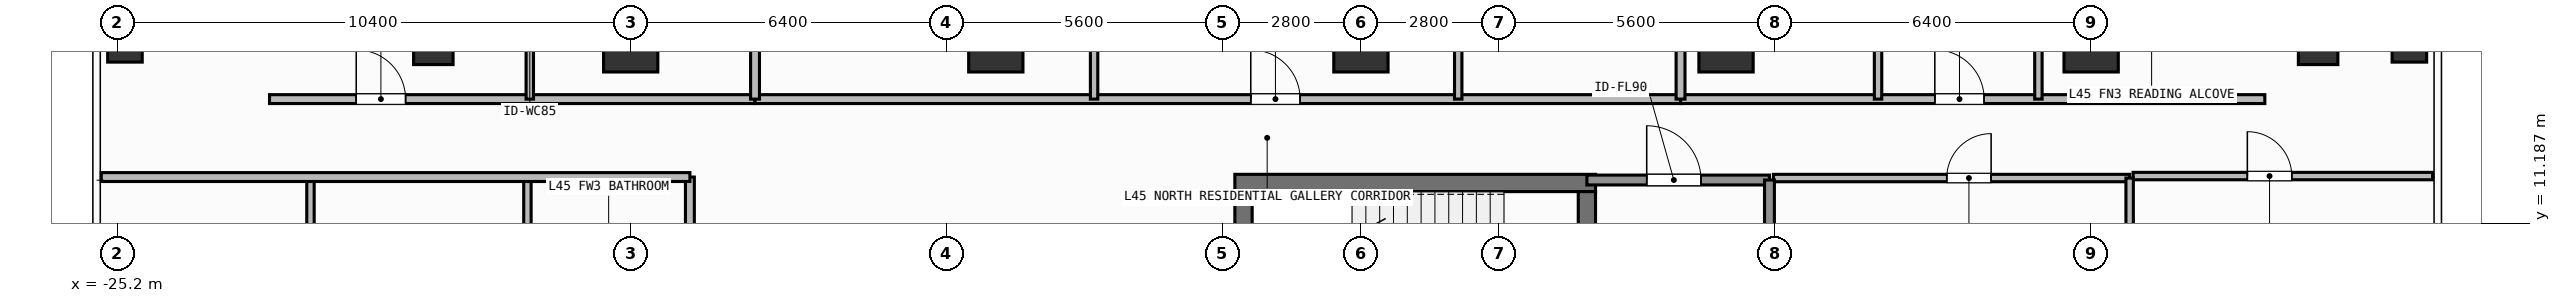
"""IFC4 building model, lengths in metres.
Left out: names, types, materials, properties, quantities, classifications, styles, units other than length and angle.
Written with IfcOpenShell. Run it as: python <this file> out.ifc"""

import sys

from ifc_helpers import new_model, si_unit, direction, frame, frame_2d, origin, origin_2d, place, context, subcontext, project, spatial, rectangle, hollow_rectangle, extrude, element, fill, save


model = new_model("IFC4")
c1 = context("Model", 3, precision=1e-05, world=origin(), true_north=direction((0.0, 1.0)))
c2 = subcontext(c1, "Body", "Model", "MODEL_VIEW")
j1 = project(units=[si_unit("LENGTHUNIT", "METRE"), si_unit("PLANEANGLEUNIT", "RADIAN")], contexts=[c1])
p1 = place(None, origin())
s1 = spatial("IfcSite", under=j1, at=p1, CompositionType="ELEMENT")
p2 = place(p1, origin())
s2 = spatial("IfcBuilding", under=s1, at=p2, CompositionType="ELEMENT")
p3 = place(p2, frame((0.0, 0.0, 183.6)))
s3 = spatial("IfcBuildingStorey", under=s2, at=p3, CompositionType="ELEMENT", Elevation=183.6)
p4 = place(p3, frame((-2.555, 12.0, 0.0), z_axis=(0.0, 0.0, 1.0), x_axis=(1.0, 0.0, 0.0)))
e1 = element("IfcWall", 1, at=p4, inside=s3, PredefinedType="SHEAR", context=c2, shape_type="SweptSolid", body=[
    extrude(rectangle(XDim=7.31, YDim=0.35, at=frame_2d((3.655, 0.0))), origin(), (0.0, 0.0, 1.0), 3.9),
])
p5 = place(p3, frame((-2.38, 8.9, 0.0), z_axis=(0.0, 0.0, 1.0), x_axis=(0.0, 1.0, 0.0)))
e2 = element("IfcWall", 2, at=p5, inside=s3, PredefinedType="SHEAR", context=c2, shape_type="SweptSolid", body=[
    extrude(rectangle(XDim=2.925, YDim=0.35, at=frame_2d((1.462, 0.0))), origin(), (0.0, 0.0, 1.0), 3.9),
])
p6 = place(p3, frame((4.58, 11.825, 0.0), z_axis=(0.0, 0.0, 1.0), x_axis=(0.0, -1.0, 0.0)))
e3 = element("IfcWall", 3, at=p6, inside=s3, PredefinedType="SHEAR", context=c2, shape_type="SweptSolid", body=[
    extrude(rectangle(XDim=2.925, YDim=0.35, at=frame_2d((1.462, 0.0))), origin(), (0.0, 0.0, 1.0), 3.9),
])
p7 = place(p6, frame((0.913, 0.0, 0.0)))
e4 = element("IfcOpeningElement", 4, at=p7, cuts=e3, PredefinedType="OPENING", context=c2, shape_type="SweptSolid", body=[
    extrude(rectangle(XDim=1.1, YDim=2.15, at=frame_2d((0.55, 1.075))), frame((0.0, 0.185, 0.0), z_axis=(0.0, -1.0, 0.0), x_axis=(1.0, 0.0, 0.0)), (0.0, 0.0, 1.0), 0.37),
])
for number, where, z_axis, x_axis in (
    (5, (-14.8, 14.8, 0.0), (0.0, 0.0, 1.0), (1.0, 0.0, 0.0)),
    (6, (-7.4, 14.8, 0.0), (0.0, 0.0, 1.0), (1.0, 0.0, 0.0)),
    (7, (0.0, 14.8, 0.0), (0.0, 0.0, 1.0), (1.0, 0.0, 0.0)),
    (8, (7.4, 14.8, 0.0), (0.0, 0.0, 1.0), (1.0, 0.0, 0.0)),
    (9, (14.8, 14.8, 0.0), (0.0, 0.0, 1.0), (1.0, 0.0, 0.0)),
):
    element("IfcColumn", number, at=place(p3, frame(where, z_axis=z_axis, x_axis=x_axis)), inside=s3, PredefinedType="COLUMN", context=c2, shape_type="SweptSolid", body=[
        extrude(rectangle(XDim=1.1, YDim=1.1, at=origin_2d()), origin(), (0.0, 0.0, 1.0), 3.9),
    ])
for number, where, z_axis, x_axis in (
    (10, (-18.8, 14.8, 0.0), (0.0, 0.0, 1.0), (1.0, 0.0, 0.0)),
    (11, (19.4, 14.8, 0.0), (0.0, 0.0, 1.0), (1.0, 0.0, 0.0)),
):
    element("IfcColumn", number, at=place(p3, frame(where, z_axis=z_axis, x_axis=x_axis)), inside=s3, PredefinedType="COLUMN", context=c2, shape_type="SweptSolid", body=[
        extrude(hollow_rectangle(XDim=0.8, YDim=0.8, WallThickness=0.036, at=origin_2d()), origin(), (0.0, 0.0, 1.0), 3.9),
    ])
for number, where, z_axis, x_axis in (
    (12, (-25.05, 14.8, 0.0), (0.0, 0.0, 1.0), (1.0, 0.0, 0.0)),
    (13, (21.25, 14.8, 0.0), (0.0, 0.0, 1.0), (1.0, 0.0, 0.0)),
):
    element("IfcColumn", number, at=place(p3, frame(where, z_axis=z_axis, x_axis=x_axis)), inside=s3, PredefinedType="COLUMN", context=c2, shape_type="SweptSolid", body=[
        extrude(hollow_rectangle(XDim=0.7, YDim=0.7, WallThickness=0.032, at=origin_2d()), origin(), (0.0, 0.0, 1.0), 3.9),
    ])
p8 = place(p3, frame((4.58, 12.06, 0.0), z_axis=(0.0, 0.0, 1.0), x_axis=(1.0, 0.0, 0.0)))
e14 = element("IfcWall", 14, at=p8, inside=s3, PredefinedType="SOLIDWALL", context=c2, shape_type="SweptSolid", body=[
    extrude(rectangle(XDim=3.7, YDim=0.2, at=frame_2d((1.85, 0.0))), origin(), (0.0, 0.0, 1.0), 3.68),
])
p9 = place(p8, frame((1.212, 0.0, 0.0)))
e15 = element("IfcOpeningElement", 15, at=p9, cuts=e14, PredefinedType="OPENING", context=c2, shape_type="SweptSolid", body=[
    extrude(rectangle(XDim=1.1, YDim=2.15, at=frame_2d((0.55, 1.075))), frame((0.0, 0.11, 0.0), z_axis=(0.0, -1.0, 0.0), x_axis=(1.0, 0.0, 0.0)), (0.0, 0.0, 1.0), 0.22),
])
p10 = place(p3, frame((8.36, 12.1, 0.0), z_axis=(0.0, 0.0, 1.0), x_axis=(1.0, 0.0, 0.0)))
e16 = element("IfcWall", 16, at=p10, inside=s3, PredefinedType="PARTITIONING", context=c2, shape_type="SweptSolid", body=[
    extrude(rectangle(XDim=7.22, YDim=0.15, at=frame_2d((3.61, 0.0))), origin(), (0.0, 0.0, 1.0), 3.68),
])
p11 = place(p10, frame((3.513, 0.0, 0.0)))
e17 = element("IfcOpeningElement", 17, at=p11, cuts=e16, PredefinedType="OPENING", context=c2, shape_type="SweptSolid", body=[
    extrude(rectangle(XDim=0.9, YDim=2.1, at=frame_2d((0.45, 1.05))), frame((0.0, 0.085, 0.0), z_axis=(0.0, -1.0, 0.0), x_axis=(1.0, 0.0, 0.0)), (0.0, 0.0, 1.0), 0.17),
])
p12 = place(p3, frame((-22.12, 13.7, 0.0), z_axis=(0.0, 0.0, 1.0), x_axis=(1.0, 0.0, 0.0)))
e18 = element("IfcWall", 18, at=p12, inside=s3, PredefinedType="PARTITIONING", context=c2, shape_type="SweptSolid", body=[
    extrude(rectangle(XDim=9.84, YDim=0.18, at=frame_2d((4.92, 0.0))), origin(), (0.0, 0.0, 1.0), 3.68),
])
p13 = place(p12, frame((1.758, 0.0, 0.0)))
e19 = element("IfcOpeningElement", 19, at=p13, cuts=e18, PredefinedType="OPENING", context=c2, shape_type="SweptSolid", body=[
    extrude(rectangle(XDim=1.0, YDim=2.2, at=frame_2d((0.5, 1.1))), frame((0.0, 0.1, 0.0), z_axis=(0.0, -1.0, 0.0), x_axis=(1.0, 0.0, 0.0)), (0.0, 0.0, 1.0), 0.2),
])
p14 = place(p3, frame((-16.845, 13.7, 0.0), z_axis=(0.0, 0.0, 1.0), x_axis=(0.0, 1.0, 0.0)))
e20 = element("IfcWall", 20, at=p14, inside=s3, PredefinedType="PARTITIONING", context=c2, shape_type="SweptSolid", body=[
    extrude(rectangle(XDim=3.129, YDim=0.15, at=frame_2d((1.564, 0.0))), origin(), (0.0, 0.0, 1.0), 3.68),
])
p15 = place(p14, frame((1.229, 0.0, 0.0)))
e21 = element("IfcOpeningElement", 21, at=p15, cuts=e20, PredefinedType="OPENING", context=c2, shape_type="SweptSolid", body=[
    extrude(rectangle(XDim=0.85, YDim=2.1, at=frame_2d((0.425, 1.05))), frame((0.0, 0.085, 0.0), z_axis=(0.0, -1.0, 0.0), x_axis=(1.0, 0.0, 0.0)), (0.0, 0.0, 1.0), 0.17),
])
p16 = place(p3, frame((-12.28, 13.7, 0.0), z_axis=(0.0, 0.0, 1.0), x_axis=(1.0, 0.0, 0.0)))
e22 = element("IfcWall", 22, at=p16, inside=s3, PredefinedType="PARTITIONING", context=c2, shape_type="SweptSolid", body=[
    extrude(rectangle(XDim=18.758, YDim=0.18, at=frame_2d((9.379, 0.0))), origin(), (0.0, 0.0, 1.0), 3.68),
])
p17 = place(p16, frame((10.048, 0.0, 0.0)))
e23 = element("IfcOpeningElement", 23, at=p17, cuts=e22, PredefinedType="OPENING", context=c2, shape_type="SweptSolid", body=[
    extrude(rectangle(XDim=1.0, YDim=2.2, at=frame_2d((0.5, 1.1))), frame((0.0, 0.1, 0.0), z_axis=(0.0, -1.0, 0.0), x_axis=(1.0, 0.0, 0.0)), (0.0, 0.0, 1.0), 0.2),
])
p18 = place(p3, frame((-5.408, 13.7, 0.0), z_axis=(0.0, 0.0, 1.0), x_axis=(0.0, 1.0, 0.0)))
e24 = element("IfcWall", 24, at=p18, inside=s3, PredefinedType="PARTITIONING", context=c2, shape_type="SweptSolid", body=[
    extrude(rectangle(XDim=5.69, YDim=0.15, at=frame_2d((2.845, 0.0))), origin(), (0.0, 0.0, 1.0), 3.68),
])
p19 = place(p18, frame((2.42, 0.0, 0.0)))
e25 = element("IfcOpeningElement", 25, at=p19, cuts=e24, PredefinedType="OPENING", context=c2, shape_type="SweptSolid", body=[
    extrude(rectangle(XDim=0.85, YDim=2.1, at=frame_2d((0.425, 1.05))), frame((0.0, 0.085, 0.0), z_axis=(0.0, -1.0, 0.0), x_axis=(1.0, 0.0, 0.0)), (0.0, 0.0, 1.0), 0.17),
])
p20 = place(p3, frame((1.972, 13.7, 0.0), z_axis=(0.0, 0.0, 1.0), x_axis=(0.0, 1.0, 0.0)))
e26 = element("IfcWall", 26, at=p20, inside=s3, PredefinedType="PARTITIONING", context=c2, shape_type="SweptSolid", body=[
    extrude(rectangle(XDim=3.824, YDim=0.15, at=frame_2d((1.912, 0.0))), origin(), (0.0, 0.0, 1.0), 3.68),
])
p21 = place(p20, frame((1.752, 0.0, 0.0)))
e27 = element("IfcOpeningElement", 27, at=p21, cuts=e26, PredefinedType="OPENING", context=c2, shape_type="SweptSolid", body=[
    extrude(rectangle(XDim=0.85, YDim=2.1, at=frame_2d((0.425, 1.05))), frame((0.0, 0.085, 0.0), z_axis=(0.0, -1.0, 0.0), x_axis=(1.0, 0.0, 0.0)), (0.0, 0.0, 1.0), 0.17),
])
p22 = place(p3, frame((6.478, 13.7, 0.0), z_axis=(0.0, 0.0, 1.0), x_axis=(1.0, 0.0, 0.0)))
e28 = element("IfcWall", 28, at=p22, inside=s3, PredefinedType="PARTITIONING", context=c2, shape_type="SweptSolid", body=[
    extrude(rectangle(XDim=11.842, YDim=0.18, at=frame_2d((5.921, 0.0))), origin(), (0.0, 0.0, 1.0), 3.68),
])
p23 = place(p22, frame((5.154, 0.0, 0.0)))
e29 = element("IfcOpeningElement", 29, at=p23, cuts=e28, PredefinedType="OPENING", context=c2, shape_type="SweptSolid", body=[
    extrude(rectangle(XDim=1.0, YDim=2.2, at=frame_2d((0.5, 1.1))), frame((0.0, 0.1, 0.0), z_axis=(0.0, -1.0, 0.0), x_axis=(1.0, 0.0, 0.0)), (0.0, 0.0, 1.0), 0.2),
])
p24 = place(p3, frame((10.481, 13.7, 0.0), z_axis=(0.0, 0.0, 1.0), x_axis=(0.0, 1.0, 0.0)))
e30 = element("IfcWall", 30, at=p24, inside=s3, PredefinedType="PARTITIONING", context=c2, shape_type="SweptSolid", body=[
    extrude(rectangle(XDim=5.69, YDim=0.15, at=frame_2d((2.845, 0.0))), origin(), (0.0, 0.0, 1.0), 3.68),
])
p25 = place(p24, frame((2.42, 0.0, 0.0)))
e31 = element("IfcOpeningElement", 31, at=p25, cuts=e30, PredefinedType="OPENING", context=c2, shape_type="SweptSolid", body=[
    extrude(rectangle(XDim=0.85, YDim=2.1, at=frame_2d((0.425, 1.05))), frame((0.0, 0.085, 0.0), z_axis=(0.0, -1.0, 0.0), x_axis=(1.0, 0.0, 0.0)), (0.0, 0.0, 1.0), 0.17),
])
p26 = place(p3, frame((13.731, 13.7, 0.0), z_axis=(0.0, 0.0, 1.0), x_axis=(0.0, 1.0, 0.0)))
e32 = element("IfcWall", 32, at=p26, inside=s3, PredefinedType="PARTITIONING", context=c2, shape_type="SweptSolid", body=[
    extrude(rectangle(XDim=3.784, YDim=0.15, at=frame_2d((1.892, 0.0))), origin(), (0.0, 0.0, 1.0), 3.68),
])
p27 = place(p26, frame((1.729, 0.0, 0.0)))
e33 = element("IfcOpeningElement", 33, at=p27, cuts=e32, PredefinedType="OPENING", context=c2, shape_type="SweptSolid", body=[
    extrude(rectangle(XDim=0.85, YDim=2.1, at=frame_2d((0.425, 1.05))), frame((0.0, 0.085, 0.0), z_axis=(0.0, -1.0, 0.0), x_axis=(1.0, 0.0, 0.0)), (0.0, 0.0, 1.0), 0.17),
])
p28 = place(p3, frame((-13.6, 4.04, 0.0), z_axis=(0.0, 0.0, 1.0), x_axis=(0.0, 1.0, 0.0)))
e34 = element("IfcWall", 34, at=p28, inside=s3, PredefinedType="PARTITIONING", context=c2, shape_type="SweptSolid", body=[
    extrude(rectangle(XDim=8.08, YDim=0.18, at=frame_2d((4.04, 0.0))), origin(), (0.0, 0.0, 1.0), 3.68),
])
p29 = place(p28, frame((1.761, 0.0, 0.0)))
e35 = element("IfcOpeningElement", 35, at=p29, cuts=e34, PredefinedType="OPENING", context=c2, shape_type="SweptSolid", body=[
    extrude(rectangle(XDim=1.0, YDim=2.2, at=frame_2d((0.5, 1.1))), frame((0.0, 0.1, 0.0), z_axis=(0.0, -1.0, 0.0), x_axis=(1.0, 0.0, 0.0)), (0.0, 0.0, 1.0), 0.2),
])
p30 = place(p3, frame((15.65, 12.14, 0.0), z_axis=(0.0, 0.0, 1.0), x_axis=(1.0, 0.0, 0.0)))
e36 = element("IfcWall", 36, at=p30, inside=s3, PredefinedType="PARTITIONING", context=c2, shape_type="SweptSolid", body=[
    extrude(rectangle(XDim=6.07, YDim=0.15, at=frame_2d((3.035, 0.0))), origin(), (0.0, 0.0, 1.0), 3.68),
])
p31 = place(p30, frame((2.316, 0.0, 0.0)))
e37 = element("IfcOpeningElement", 37, at=p31, cuts=e36, PredefinedType="OPENING", context=c2, shape_type="SweptSolid", body=[
    extrude(rectangle(XDim=0.9, YDim=2.1, at=frame_2d((0.45, 1.05))), frame((0.0, 0.085, 0.0), z_axis=(0.0, -1.0, 0.0), x_axis=(1.0, 0.0, 0.0)), (0.0, 0.0, 1.0), 0.17),
])
p32 = place(p3, frame((8.28, 8.8, 0.0), z_axis=(0.0, 0.0, 1.0), x_axis=(0.0, 1.0, 0.0)))
e38 = element("IfcWall", 38, at=p32, inside=s3, PredefinedType="SOLIDWALL", context=c2, shape_type="SweptSolid", body=[
    extrude(rectangle(XDim=3.26, YDim=0.2, at=frame_2d((1.63, 0.0))), origin(), (0.0, 0.0, 1.0), 3.68),
])
p33 = place(p3, frame((15.58, 5.85, 0.0), z_axis=(0.0, 0.0, 1.0), x_axis=(0.0, 1.0, 0.0)))
e39 = element("IfcWall", 39, at=p33, inside=s3, PredefinedType="PARTITIONING", context=c2, shape_type="SweptSolid", body=[
    extrude(rectangle(XDim=6.25, YDim=0.15, at=frame_2d((3.125, 0.0))), origin(), (0.0, 0.0, 1.0), 3.68),
])
for number, where, z_axis, x_axis in (
    (40, (-12.28, 13.7, 0.0), (0.0, 0.0, 1.0), (0.0, 1.0, 0.0)),
    (41, (6.478, 13.7, 0.0), (0.0, 0.0, 1.0), (0.0, 1.0, 0.0)),
):
    element("IfcWall", number, at=place(p3, frame(where, z_axis=z_axis, x_axis=x_axis)), inside=s3, PredefinedType="PARTITIONING", context=c2, shape_type="SweptSolid", body=[
        extrude(rectangle(XDim=9.93, YDim=0.18, at=frame_2d((4.965, 0.0))), origin(), (0.0, 0.0, 1.0), 3.68),
    ])
for number, where, z_axis, x_axis in (
    (42, (-16.893, 9.32, 0.0), (0.0, 0.0, 1.0), (0.0, 1.0, 0.0)),
    (43, (-21.29, 9.32, 0.0), (0.0, 0.0, 1.0), (0.0, 1.0, 0.0)),
):
    element("IfcWall", number, at=place(p3, frame(where, z_axis=z_axis, x_axis=x_axis)), inside=s3, PredefinedType="PARTITIONING", context=c2, shape_type="SweptSolid", body=[
        extrude(rectangle(XDim=2.8, YDim=0.15, at=frame_2d((1.4, 0.0))), origin(), (0.0, 0.0, 1.0), 3.68),
    ])
p34 = place(p3, frame((-25.53, 12.12, 0.0), z_axis=(0.0, 0.0, 1.0), x_axis=(1.0, 0.0, 0.0)))
e44 = element("IfcWall", 44, at=p34, inside=s3, PredefinedType="PARTITIONING", context=c2, shape_type="SweptSolid", body=[
    extrude(rectangle(XDim=11.93, YDim=0.18, at=frame_2d((5.965, 0.0))), origin(), (0.0, 0.0, 1.0), 3.68),
])
p35 = place(p9, origin())
e45 = element("IfcDoor", 45, at=p35, inside=s3, OperationType="SINGLE_SWING_LEFT", PredefinedType="DOOR", context=c2, shape_type="SweptSolid", body=[
    extrude(rectangle(XDim=1.1, YDim=2.15, at=frame_2d((0.55, 1.075))), frame((0.0, 0.025, 0.0), z_axis=(0.0, -1.0, 0.0), x_axis=(1.0, 0.0, 0.0)), (0.0, 0.0, 1.0), 0.05),
])
fill(e15, e45)
p36 = place(p11, origin())
e46 = element("IfcDoor", 46, at=p36, inside=s3, OperationType="SINGLE_SWING_RIGHT", PredefinedType="DOOR", context=c2, shape_type="SweptSolid", body=[
    extrude(rectangle(XDim=0.9, YDim=2.1, at=frame_2d((0.45, 1.05))), frame((0.0, 0.025, 0.0), z_axis=(0.0, -1.0, 0.0), x_axis=(1.0, 0.0, 0.0)), (0.0, 0.0, 1.0), 0.05),
])
fill(e17, e46)
p37 = place(p13, origin())
e47 = element("IfcDoor", 47, at=p37, inside=s3, OperationType="SINGLE_SWING_LEFT", PredefinedType="DOOR", context=c2, shape_type="SweptSolid", body=[
    extrude(rectangle(XDim=1.0, YDim=2.2, at=frame_2d((0.5, 1.1))), frame((0.0, 0.025, 0.0), z_axis=(0.0, -1.0, 0.0), x_axis=(1.0, 0.0, 0.0)), (0.0, 0.0, 1.0), 0.05),
])
fill(e19, e47)
p38 = place(p17, origin())
e48 = element("IfcDoor", 48, at=p38, inside=s3, OperationType="SINGLE_SWING_LEFT", PredefinedType="DOOR", context=c2, shape_type="SweptSolid", body=[
    extrude(rectangle(XDim=1.0, YDim=2.2, at=frame_2d((0.5, 1.1))), frame((0.0, 0.025, 0.0), z_axis=(0.0, -1.0, 0.0), x_axis=(1.0, 0.0, 0.0)), (0.0, 0.0, 1.0), 0.05),
])
fill(e23, e48)
p39 = place(p23, origin())
e49 = element("IfcDoor", 49, at=p39, inside=s3, OperationType="SINGLE_SWING_LEFT", PredefinedType="DOOR", context=c2, shape_type="SweptSolid", body=[
    extrude(rectangle(XDim=1.0, YDim=2.2, at=frame_2d((0.5, 1.1))), frame((0.0, 0.025, 0.0), z_axis=(0.0, -1.0, 0.0), x_axis=(1.0, 0.0, 0.0)), (0.0, 0.0, 1.0), 0.05),
])
fill(e29, e49)
p40 = place(p31, origin())
e50 = element("IfcDoor", 50, at=p40, inside=s3, OperationType="SINGLE_SWING_LEFT", PredefinedType="DOOR", context=c2, shape_type="SweptSolid", body=[
    extrude(rectangle(XDim=0.9, YDim=2.1, at=frame_2d((0.45, 1.05))), frame((0.0, 0.025, 0.0), z_axis=(0.0, -1.0, 0.0), x_axis=(1.0, 0.0, 0.0)), (0.0, 0.0, 1.0), 0.05),
])
fill(e37, e50)
save(model, sys.argv[1])
